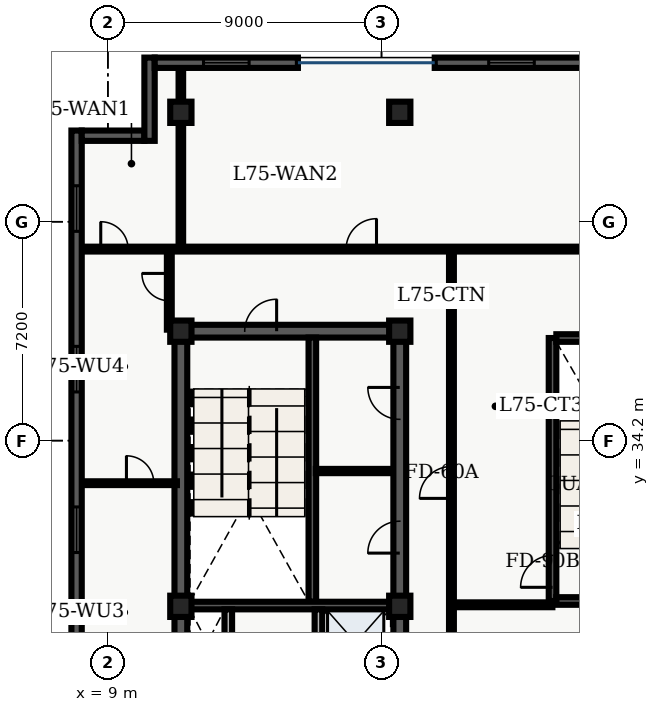
"""IFC4 building model, lengths in metres.
Left out: names, types, materials, properties, quantities, classifications, styles, units other than length and angle.
Written with IfcOpenShell. Run it as: python <this file> out.ifc"""

import sys

from ifc_helpers import new_model, entity, si_unit, converted_unit, direction, frame, origin_with_axes, origin_2d_with_axis, place, context, subcontext, project, spatial, polyline, rectangle, outline, extrude, element, fill, save


model = new_model("IFC4")
c1 = context("Model", 3, precision=1e-05, world=origin_with_axes(), true_north=direction((0.0, 1.0)))
c2 = subcontext(c1, "Body", "Model", "MODEL_VIEW")
j1 = project(units=[si_unit("LENGTHUNIT", "METRE"), converted_unit("PLANEANGLEUNIT", "DEGREE", entity("IfcPlaneAngleMeasure", 0.017), si_unit("PLANEANGLEUNIT", "RADIAN"), dimensions=[0, 0, 0, 0, 0, 0, 0])], contexts=[c1])
p1 = place(None, origin_with_axes())
s1 = spatial("IfcSite", under=j1, at=p1, CompositionType="ELEMENT")
p2 = place(p1, origin_with_axes())
s2 = spatial("IfcBuilding", under=s1, at=p2, CompositionType="ELEMENT")
p3 = place(p2, frame((0.0, 0.0, 303.6), z_axis=(0.0, 0.0, 1.0), x_axis=(1.0, 0.0, 0.0)))
s3 = spatial("IfcBuildingStorey", under=s2, at=p3, CompositionType="ELEMENT", Elevation=303.6)
p4 = place(p3, frame((11.4, 10.8, 0.0), z_axis=(0.0, 0.0, 1.0), x_axis=(0.0, 1.0, 0.0)))
e1 = element("IfcWall", 1, at=p4, inside=s3, PredefinedType="SHEAR", context=c2, shape_type="SweptSolid", body=[
    extrude(outline(polyline([(0.0, -0.21), (27.0, -0.21), (27.0, 0.21), (0.0, 0.21), (0.0, -0.21)])), origin_with_axes(), (0.0, 0.0, 1.0), 4.84),
])
p5 = place(p3, frame((11.4, 37.8, 0.0), z_axis=(0.0, 0.0, 1.0), x_axis=(1.0, 0.0, 0.0)))
e2 = element("IfcWall", 2, at=p5, inside=s3, PredefinedType="SHEAR", context=c2, shape_type="SweptSolid", body=[
    extrude(outline(polyline([(0.0, -0.21), (7.2, -0.21), (7.2, 0.21), (0.0, 0.21), (0.0, -0.21)])), origin_with_axes(), (0.0, 0.0, 1.0), 4.84),
])
p6 = place(p5, frame((2.625, 0.0, 0.0), z_axis=(0.0, 0.0, 1.0), x_axis=(1.0, 0.0, 0.0)))
e3 = element("IfcOpeningElement", 3, at=p6, cuts=e2, PredefinedType="OPENING", context=c2, shape_type="SweptSolid", body=[
    extrude(rectangle(XDim=1.05, YDim=0.44, at=origin_2d_with_axis()), origin_with_axes(), (0.0, 0.0, 1.0), 2.15),
])
p7 = place(p3, frame((18.6, 24.3, 0.0), z_axis=(0.0, 0.0, 1.0), x_axis=(0.0, 1.0, 0.0)))
e4 = element("IfcWall", 4, at=p7, inside=s3, PredefinedType="SHEAR", context=c2, shape_type="SweptSolid", body=[
    extrude(outline(polyline([(0.0, -0.21), (13.5, -0.21), (13.5, 0.21), (0.0, 0.21), (0.0, -0.21)])), origin_with_axes(), (0.0, 0.0, 1.0), 4.84),
])
p8 = place(p7, frame((2.9, 0.0, 0.0), z_axis=(0.0, 0.0, 1.0), x_axis=(1.0, 0.0, 0.0)))
e5 = element("IfcOpeningElement", 5, at=p8, cuts=e4, PredefinedType="OPENING", context=c2, shape_type="SweptSolid", body=[
    extrude(rectangle(XDim=1.1, YDim=0.44, at=origin_2d_with_axis()), origin_with_axes(), (0.0, 0.0, 1.0), 2.15),
])
p9 = place(p7, frame((6.725, 0.0, 0.0), z_axis=(0.0, 0.0, 1.0), x_axis=(1.0, 0.0, 0.0)))
e6 = element("IfcOpeningElement", 6, at=p9, cuts=e4, PredefinedType="OPENING", context=c2, shape_type="SweptSolid", body=[
    extrude(rectangle(XDim=1.05, YDim=0.44, at=origin_2d_with_axis()), origin_with_axes(), (0.0, 0.0, 1.0), 2.15),
])
p10 = place(p7, frame((11.125, 0.0, 0.0), z_axis=(0.0, 0.0, 1.0), x_axis=(1.0, 0.0, 0.0)))
e7 = element("IfcOpeningElement", 7, at=p10, cuts=e4, PredefinedType="OPENING", context=c2, shape_type="SweptSolid", body=[
    extrude(rectangle(XDim=1.05, YDim=0.44, at=origin_2d_with_axis()), origin_with_axes(), (0.0, 0.0, 1.0), 2.15),
])
p11 = place(p3, frame((15.725, 28.9, 0.0), z_axis=(0.0, 0.0, 1.0), x_axis=(0.0, 1.0, 0.0)))
e8 = element("IfcWall", 8, at=p11, inside=s3, PredefinedType="SHEAR", context=c2, shape_type="SweptSolid", body=[
    extrude(outline(polyline([(0.0, -0.125), (8.69, -0.125), (8.69, 0.125), (0.0, 0.125), (0.0, -0.125)])), origin_with_axes(), (0.0, 0.0, 1.0), 4.84),
])
p12 = place(p3, frame((11.61, 28.775, 0.0), z_axis=(0.0, 0.0, 1.0), x_axis=(1.0, 0.0, 0.0)))
e9 = element("IfcWall", 9, at=p12, inside=s3, PredefinedType="SHEAR", context=c2, shape_type="SweptSolid", body=[
    extrude(outline(polyline([(0.0, -0.125), (6.78, -0.125), (6.78, 0.125), (0.0, 0.125), (0.0, -0.125)])), origin_with_axes(), (0.0, 0.0, 1.0), 4.84),
])
for number, where, z_axis, x_axis in (
    (10, (12.96, 26.45, 0.0), (0.0, 0.0, 1.0), (0.0, 1.0, 0.0)),
    (11, (15.925, 26.45, 0.0), (0.0, 0.0, 1.0), (0.0, 1.0, 0.0)),
):
    element("IfcWall", number, at=place(p3, frame(where, z_axis=z_axis, x_axis=x_axis)), inside=s3, PredefinedType="SOLIDWALL", context=c2, shape_type="SweptSolid", body=[
        extrude(outline(polyline([(0.0, -0.125), (2.2, -0.125), (2.2, 0.125), (0.0, 0.125), (0.0, -0.125)])), origin_with_axes(), (0.0, 0.0, 1.0), 3.6),
    ])
p13 = place(p3, frame((23.625, 28.925, 0.0), z_axis=(0.0, 0.0, 1.0), x_axis=(0.0, 1.0, 0.0)))
e12 = element("IfcWall", 12, at=p13, inside=s3, PredefinedType="SHEAR", context=c2, shape_type="SweptSolid", body=[
    extrude(outline(polyline([(0.0, -0.125), (8.65, -0.125), (8.65, 0.125), (0.0, 0.125), (0.0, -0.125)])), origin_with_axes(), (0.0, 0.0, 1.0), 4.84),
])
p14 = place(p13, frame((0.975, 0.0, 0.0), z_axis=(0.0, 0.0, 1.0), x_axis=(1.0, 0.0, 0.0)))
e13 = element("IfcOpeningElement", 13, at=p14, cuts=e12, PredefinedType="OPENING", context=c2, shape_type="SweptSolid", body=[
    extrude(rectangle(XDim=1.05, YDim=0.27, at=origin_2d_with_axis()), origin_with_axes(), (0.0, 0.0, 1.0), 2.15),
])
for number, where, z_axis, x_axis in (
    (14, (23.75, 28.925, 0.0), (0.0, 0.0, 1.0), (1.0, 0.0, 0.0)),
    (15, (23.75, 37.575, 0.0), (0.0, 0.0, 1.0), (1.0, 0.0, 0.0)),
):
    element("IfcWall", number, at=place(p3, frame(where, z_axis=z_axis, x_axis=x_axis)), inside=s3, PredefinedType="SHEAR", context=c2, shape_type="SweptSolid", body=[
        extrude(outline(polyline([(0.0, -0.125), (3.9, -0.125), (3.9, 0.125), (0.0, 0.125), (0.0, -0.125)])), origin_with_axes(), (0.0, 0.0, 1.0), 4.84),
    ])
for number, where, z_axis, x_axis in (
    (16, (11.4, 28.75, 0.0), (0.0, 0.0, 1.0), (1.0, 0.0, 0.0)),
    (17, (11.4, 37.8, 0.0), (0.0, 0.0, 1.0), (1.0, 0.0, 0.0)),
    (18, (11.4, 45.0, 0.0), (0.0, 0.0, 1.0), (1.0, 0.0, 0.0)),
    (19, (18.6, 28.75, 0.0), (0.0, 0.0, 1.0), (1.0, 0.0, 0.0)),
    (20, (18.6, 37.8, 0.0), (0.0, 0.0, 1.0), (1.0, 0.0, 0.0)),
    (21, (18.6, 45.0, 0.0), (0.0, 0.0, 1.0), (1.0, 0.0, 0.0)),
):
    element("IfcColumn", number, at=place(p3, frame(where, z_axis=z_axis, x_axis=x_axis)), inside=s3, PredefinedType="COLUMN", context=c2, shape_type="SweptSolid", body=[
        extrude(rectangle(XDim=0.7, YDim=0.7, at=origin_2d_with_axis()), origin_with_axes(), (0.0, 0.0, 1.0), 5.1),
    ])
p15 = place(p3, frame((15.84, 33.2, 0.0), z_axis=(0.0, 0.0, 1.0), x_axis=(1.0, 0.0, 0.0)))
e22 = element("IfcWall", 22, at=p15, inside=s3, PredefinedType="PARTITIONING", context=c2, shape_type="SweptSolid", body=[
    extrude(outline(polyline([(0.0, -0.07), (2.46, -0.07), (2.46, 0.07), (0.0, 0.07), (0.0, -0.07)])), origin_with_axes(), (0.0, 0.0, 1.0), 3.2),
])
p16 = place(p3, frame((8.135, 40.5, 0.0), z_axis=(0.0, 0.0, 1.0), x_axis=(1.0, 0.0, 0.0)))
e23 = element("IfcWall", 23, at=p16, inside=s3, PredefinedType="PARTITIONING", context=c2, shape_type="SweptSolid", body=[
    extrude(outline(polyline([(0.0, -0.08), (22.715, -0.08), (22.715, 0.08), (0.0, 0.08), (0.0, -0.08)])), origin_with_axes(), (0.0, 0.0, 1.0), 3.2),
])
p17 = place(p16, frame((1.08, 0.0, 0.0), z_axis=(0.0, 0.0, 1.0), x_axis=(1.0, 0.0, 0.0)))
e24 = element("IfcOpeningElement", 24, at=p17, cuts=e23, PredefinedType="OPENING", context=c2, shape_type="SweptSolid", body=[
    extrude(rectangle(XDim=0.9, YDim=0.18, at=origin_2d_with_axis()), origin_with_axes(), (0.0, 0.0, 1.0), 2.15),
])
p18 = place(p16, frame((9.2, 0.0, 0.0), z_axis=(0.0, 0.0, 1.0), x_axis=(1.0, 0.0, 0.0)))
e25 = element("IfcOpeningElement", 25, at=p18, cuts=e23, PredefinedType="OPENING", context=c2, shape_type="SweptSolid", body=[
    extrude(rectangle(XDim=1.0, YDim=0.18, at=origin_2d_with_axis()), origin_with_axes(), (0.0, 0.0, 1.0), 2.15),
])
p19 = place(p3, frame((20.3, 2.14, 0.0), z_axis=(0.0, 0.0, 1.0), x_axis=(0.0, 1.0, 0.0)))
e26 = element("IfcWall", 26, at=p19, inside=s3, PredefinedType="PARTITIONING", context=c2, shape_type="SweptSolid", body=[
    extrude(outline(polyline([(0.0, -0.08), (38.36, -0.08), (38.36, 0.08), (0.0, 0.08), (0.0, -0.08)])), origin_with_axes(), (0.0, 0.0, 1.0), 3.2),
])
p20 = place(p19, frame((30.685, 0.0, 0.0), z_axis=(0.0, 0.0, 1.0), x_axis=(1.0, 0.0, 0.0)))
e27 = element("IfcOpeningElement", 27, at=p20, cuts=e26, PredefinedType="OPENING", context=c2, shape_type="SweptSolid", body=[
    extrude(rectangle(XDim=1.05, YDim=0.18, at=origin_2d_with_axis()), origin_with_axes(), (0.0, 0.0, 1.0), 2.15),
])
p21 = place(p19, frame((13.275, 0.0, 0.0), z_axis=(0.0, 0.0, 1.0), x_axis=(1.0, 0.0, 0.0)))
e28 = element("IfcOpeningElement", 28, at=p21, cuts=e26, PredefinedType="OPENING", context=c2, shape_type="SweptSolid", body=[
    extrude(rectangle(XDim=1.0, YDim=0.18, at=origin_2d_with_axis()), origin_with_axes(), (0.0, 0.0, 1.0), 2.15),
])
p22 = place(p3, frame((20.3, 28.8, 0.0), z_axis=(0.0, 0.0, 1.0), x_axis=(1.0, 0.0, 0.0)))
e29 = element("IfcWall", 29, at=p22, inside=s3, PredefinedType="PARTITIONING", context=c2, shape_type="SweptSolid", body=[
    extrude(outline(polyline([(0.0, -0.08), (3.32, -0.08), (3.32, 0.08), (0.0, 0.08), (0.0, -0.08)])), origin_with_axes(), (0.0, 0.0, 1.0), 3.2),
])
p23 = place(p3, frame((11.02, 37.85, 0.0), z_axis=(0.0, 0.0, 1.0), x_axis=(0.0, 1.0, 0.0)))
e30 = element("IfcWall", 30, at=p23, inside=s3, PredefinedType="PARTITIONING", context=c2, shape_type="SweptSolid", body=[
    extrude(outline(polyline([(0.0, -0.08), (2.65, -0.08), (2.65, 0.08), (0.0, 0.08), (0.0, -0.08)])), origin_with_axes(), (0.0, 0.0, 1.0), 3.2),
])
p24 = place(p23, frame((1.4, 0.0, 0.0), z_axis=(0.0, 0.0, 1.0), x_axis=(1.0, 0.0, 0.0)))
e31 = element("IfcOpeningElement", 31, at=p24, cuts=e30, PredefinedType="OPENING", context=c2, shape_type="SweptSolid", body=[
    extrude(rectangle(XDim=0.9, YDim=0.18, at=origin_2d_with_axis()), origin_with_axes(), (0.0, 0.0, 1.0), 2.15),
])
p25 = place(p3, frame((8.135, 32.8, 0.0), z_axis=(0.0, 0.0, 1.0), x_axis=(1.0, 0.0, 0.0)))
e32 = element("IfcWall", 32, at=p25, inside=s3, PredefinedType="PARTITIONING", context=c2, shape_type="SweptSolid", body=[
    extrude(outline(polyline([(0.0, -0.062), (3.135, -0.062), (3.135, 0.062), (0.0, 0.062), (0.0, -0.062)])), origin_with_axes(), (0.0, 0.0, 1.0), 3.2),
])
p26 = place(p25, frame((1.925, 0.0, 0.0), z_axis=(0.0, 0.0, 1.0), x_axis=(1.0, 0.0, 0.0)))
e33 = element("IfcOpeningElement", 33, at=p26, cuts=e32, PredefinedType="OPENING", context=c2, shape_type="SweptSolid", body=[
    extrude(rectangle(XDim=0.9, YDim=0.145, at=origin_2d_with_axis()), origin_with_axes(), (0.0, 0.0, 1.0), 2.15),
])
p27 = place(p3, frame((11.4, 40.6, 0.0), z_axis=(0.0, 0.0, 1.0), x_axis=(0.0, 1.0, 0.0)))
e34 = element("IfcWall", 34, at=p27, inside=s3, PredefinedType="PARTITIONING", context=c2, shape_type="SweptSolid", body=[
    extrude(outline(polyline([(0.0, -0.075), (5.865, -0.075), (5.865, 0.075), (0.0, 0.075), (0.0, -0.075)])), origin_with_axes(), (0.0, 0.0, 1.0), 3.2),
])
p28 = place(p3, frame((7.97, 4.54, 0.0), z_axis=(0.0, 0.0, 1.0), x_axis=(0.0, 1.0, 0.0)))
e35 = element("IfcWall", 35, at=p28, inside=s3, PredefinedType="SOLIDWALL", context=c2, shape_type="SweptSolid", body=[
    extrude(outline(polyline([(0.0, -0.17), (39.86, -0.17), (39.86, 0.17), (0.0, 0.17), (0.0, -0.17)])), origin_with_axes(), (0.0, 0.0, 1.0), 4.84),
])
p29 = place(p28, frame((7.849, 0.0, 0.45), z_axis=(0.0, 0.0, 1.0), x_axis=(1.0, 0.0, 0.0)))
e36 = element("IfcOpeningElement", 36, at=p29, cuts=e35, PredefinedType="OPENING", context=c2, shape_type="SweptSolid", body=[
    extrude(rectangle(XDim=1.5, YDim=0.36, at=origin_2d_with_axis()), origin_with_axes(), (0.0, 0.0, 1.0), 2.1),
])
p30 = place(p28, frame((12.681, 0.0, 0.45), z_axis=(0.0, 0.0, 1.0), x_axis=(1.0, 0.0, 0.0)))
e37 = element("IfcOpeningElement", 37, at=p30, cuts=e35, PredefinedType="OPENING", context=c2, shape_type="SweptSolid", body=[
    extrude(rectangle(XDim=1.5, YDim=0.36, at=origin_2d_with_axis()), origin_with_axes(), (0.0, 0.0, 1.0), 2.1),
])
p31 = place(p28, frame((17.514, 0.0, 0.45), z_axis=(0.0, 0.0, 1.0), x_axis=(1.0, 0.0, 0.0)))
e38 = element("IfcOpeningElement", 38, at=p31, cuts=e35, PredefinedType="OPENING", context=c2, shape_type="SweptSolid", body=[
    extrude(rectangle(XDim=1.5, YDim=0.36, at=origin_2d_with_axis()), origin_with_axes(), (0.0, 0.0, 1.0), 2.1),
])
p32 = place(p28, frame((22.346, 0.0, 0.45), z_axis=(0.0, 0.0, 1.0), x_axis=(1.0, 0.0, 0.0)))
e39 = element("IfcOpeningElement", 39, at=p32, cuts=e35, PredefinedType="OPENING", context=c2, shape_type="SweptSolid", body=[
    extrude(rectangle(XDim=1.5, YDim=0.36, at=origin_2d_with_axis()), origin_with_axes(), (0.0, 0.0, 1.0), 2.1),
])
p33 = place(p28, frame((26.729, 0.0, 0.45), z_axis=(0.0, 0.0, 1.0), x_axis=(1.0, 0.0, 0.0)))
e40 = element("IfcOpeningElement", 40, at=p33, cuts=e35, PredefinedType="OPENING", context=c2, shape_type="SweptSolid", body=[
    extrude(rectangle(XDim=1.5, YDim=0.36, at=origin_2d_with_axis()), origin_with_axes(), (0.0, 0.0, 1.0), 2.1),
])
p34 = place(p28, frame((32.011, 0.0, 0.45), z_axis=(0.0, 0.0, 1.0), x_axis=(1.0, 0.0, 0.0)))
e41 = element("IfcOpeningElement", 41, at=p34, cuts=e35, PredefinedType="OPENING", context=c2, shape_type="SweptSolid", body=[
    extrude(rectangle(XDim=1.5, YDim=0.36, at=origin_2d_with_axis()), origin_with_axes(), (0.0, 0.0, 1.0), 2.1),
])
p35 = place(p28, frame((37.294, 0.0, 0.45), z_axis=(0.0, 0.0, 1.0), x_axis=(1.0, 0.0, 0.0)))
e42 = element("IfcOpeningElement", 42, at=p35, cuts=e35, PredefinedType="OPENING", context=c2, shape_type="SweptSolid", body=[
    extrude(rectangle(XDim=1.5, YDim=0.36, at=origin_2d_with_axis()), origin_with_axes(), (0.0, 0.0, 1.0), 2.1),
])
p36 = place(p3, frame((8.14, 44.23, 0.0), z_axis=(0.0, 0.0, 1.0), x_axis=(1.0, 0.0, 0.0)))
e43 = element("IfcWall", 43, at=p36, inside=s3, PredefinedType="SOLIDWALL", context=c2, shape_type="SweptSolid", body=[
    extrude(outline(polyline([(0.0, -0.17), (2.06, -0.17), (2.06, 0.17), (0.0, 0.17), (0.0, -0.17)])), origin_with_axes(), (0.0, 0.0, 1.0), 4.84),
])
p37 = place(p3, frame((10.37, 44.06, 0.0), z_axis=(0.0, 0.0, 1.0), x_axis=(0.0, 1.0, 0.0)))
e44 = element("IfcWall", 44, at=p37, inside=s3, PredefinedType="SOLIDWALL", context=c2, shape_type="SweptSolid", body=[
    extrude(outline(polyline([(0.0, -0.17), (2.74, -0.17), (2.74, 0.17), (0.0, 0.17), (0.0, -0.17)])), origin_with_axes(), (0.0, 0.0, 1.0), 4.84),
])
p38 = place(p3, frame((10.54, 46.63, 0.0), z_axis=(0.0, 0.0, 1.0), x_axis=(1.0, 0.0, 0.0)))
e45 = element("IfcWall", 45, at=p38, inside=s3, PredefinedType="SOLIDWALL", context=c2, shape_type="SweptSolid", body=[
    extrude(outline(polyline([(0.0, -0.17), (4.71, -0.17), (4.71, 0.17), (0.0, 0.17), (0.0, -0.17)])), origin_with_axes(), (0.0, 0.0, 1.0), 4.84),
])
p39 = place(p38, frame((2.355, 0.0, 0.45), z_axis=(0.0, 0.0, 1.0), x_axis=(1.0, 0.0, 0.0)))
e46 = element("IfcOpeningElement", 46, at=p39, cuts=e45, PredefinedType="OPENING", context=c2, shape_type="SweptSolid", body=[
    extrude(rectangle(XDim=1.5, YDim=0.36, at=origin_2d_with_axis()), origin_with_axes(), (0.0, 0.0, 1.0), 2.1),
])
p40 = place(p3, frame((19.75, 46.63, 0.0), z_axis=(0.0, 0.0, 1.0), x_axis=(1.0, 0.0, 0.0)))
e47 = element("IfcWall", 47, at=p40, inside=s3, PredefinedType="SOLIDWALL", context=c2, shape_type="SweptSolid", body=[
    extrude(outline(polyline([(0.0, -0.17), (5.05, -0.17), (5.05, 0.17), (0.0, 0.17), (0.0, -0.17)])), origin_with_axes(), (0.0, 0.0, 1.0), 4.84),
])
p41 = place(p40, frame((2.525, 0.0, 0.45), z_axis=(0.0, 0.0, 1.0), x_axis=(1.0, 0.0, 0.0)))
e48 = element("IfcOpeningElement", 48, at=p41, cuts=e47, PredefinedType="OPENING", context=c2, shape_type="SweptSolid", body=[
    extrude(rectangle(XDim=1.5, YDim=0.36, at=origin_2d_with_axis()), origin_with_axes(), (0.0, 0.0, 1.0), 2.1),
])
p42 = place(p5, frame((2.625, 0.0, 0.0), z_axis=(0.0, 0.0, 1.0), x_axis=(1.0, 0.0, 0.0)))
e49 = element("IfcDoor", 49, at=p42, inside=s3, OperationType="SINGLE_SWING_RIGHT", PredefinedType="DOOR", context=c2, shape_type="SweptSolid", body=[
    extrude(rectangle(XDim=1.05, YDim=0.09, at=origin_2d_with_axis()), origin_with_axes(), (0.0, 0.0, 1.0), 2.15),
])
fill(e3, e49)
p43 = place(p7, frame((6.725, 0.0, 0.0), z_axis=(0.0, 0.0, 1.0), x_axis=(1.0, 0.0, 0.0)))
e50 = element("IfcDoor", 50, at=p43, inside=s3, OperationType="SINGLE_SWING_LEFT", PredefinedType="DOOR", context=c2, shape_type="SweptSolid", body=[
    extrude(rectangle(XDim=1.05, YDim=0.09, at=origin_2d_with_axis()), origin_with_axes(), (0.0, 0.0, 1.0), 2.15),
])
fill(e6, e50)
p44 = place(p7, frame((11.125, 0.0, 0.0), z_axis=(0.0, 0.0, 1.0), x_axis=(1.0, 0.0, 0.0)))
e51 = element("IfcDoor", 51, at=p44, inside=s3, OperationType="SINGLE_SWING_RIGHT", PredefinedType="DOOR", context=c2, shape_type="SweptSolid", body=[
    extrude(rectangle(XDim=1.05, YDim=0.09, at=origin_2d_with_axis()), origin_with_axes(), (0.0, 0.0, 1.0), 2.15),
])
fill(e7, e51)
p45 = place(p13, frame((0.975, 0.0, 0.0), z_axis=(0.0, 0.0, 1.0), x_axis=(1.0, 0.0, 0.0)))
e52 = element("IfcDoor", 52, at=p45, inside=s3, OperationType="SINGLE_SWING_LEFT", PredefinedType="DOOR", context=c2, shape_type="SweptSolid", body=[
    extrude(rectangle(XDim=1.05, YDim=0.09, at=origin_2d_with_axis()), origin_with_axes(), (0.0, 0.0, 1.0), 2.15),
])
fill(e13, e52)
p46 = place(p19, frame((30.685, 0.0, 0.0), z_axis=(0.0, 0.0, 1.0), x_axis=(1.0, 0.0, 0.0)))
e53 = element("IfcDoor", 53, at=p46, inside=s3, OperationType="SINGLE_SWING_LEFT", PredefinedType="DOOR", context=c2, shape_type="SweptSolid", body=[
    extrude(rectangle(XDim=1.05, YDim=0.09, at=origin_2d_with_axis()), origin_with_axes(), (0.0, 0.0, 1.0), 2.15),
])
fill(e27, e53)
p47 = place(p25, frame((1.925, 0.0, 0.0), z_axis=(0.0, 0.0, 1.0), x_axis=(1.0, 0.0, 0.0)))
e54 = element("IfcDoor", 54, at=p47, inside=s3, OperationType="SINGLE_SWING_LEFT", PredefinedType="DOOR", context=c2, shape_type="SweptSolid", body=[
    extrude(rectangle(XDim=0.9, YDim=0.075, at=origin_2d_with_axis()), origin_with_axes(), (0.0, 0.0, 1.0), 2.15),
])
fill(e33, e54)
p48 = place(p23, frame((1.4, 0.0, 0.0), z_axis=(0.0, 0.0, 1.0), x_axis=(1.0, 0.0, 0.0)))
e55 = element("IfcDoor", 55, at=p48, inside=s3, OperationType="SINGLE_SWING_RIGHT", PredefinedType="DOOR", context=c2, shape_type="SweptSolid", body=[
    extrude(rectangle(XDim=0.9, YDim=0.09, at=origin_2d_with_axis()), origin_with_axes(), (0.0, 0.0, 1.0), 2.15),
])
fill(e31, e55)
p49 = place(p16, frame((1.08, 0.0, 0.0), z_axis=(0.0, 0.0, 1.0), x_axis=(1.0, 0.0, 0.0)))
e56 = element("IfcDoor", 56, at=p49, inside=s3, OperationType="SINGLE_SWING_LEFT", PredefinedType="DOOR", context=c2, shape_type="SweptSolid", body=[
    extrude(rectangle(XDim=0.9, YDim=0.09, at=origin_2d_with_axis()), origin_with_axes(), (0.0, 0.0, 1.0), 2.15),
])
fill(e24, e56)
p50 = place(p16, frame((9.2, 0.0, 0.0), z_axis=(0.0, 0.0, 1.0), x_axis=(1.0, 0.0, 0.0)))
e57 = element("IfcDoor", 57, at=p50, inside=s3, OperationType="SINGLE_SWING_RIGHT", PredefinedType="DOOR", context=c2, shape_type="SweptSolid", body=[
    extrude(rectangle(XDim=1.0, YDim=0.09, at=origin_2d_with_axis()), origin_with_axes(), (0.0, 0.0, 1.0), 2.15),
])
fill(e25, e57)
p51 = place(p28, frame((26.729, 0.0, 0.45), z_axis=(0.0, 0.0, 1.0), x_axis=(1.0, 0.0, 0.0)))
e58 = element("IfcWindow", 58, at=p51, inside=s3, PredefinedType="WINDOW", context=c2, shape_type="SweptSolid", body=[
    extrude(rectangle(XDim=1.5, YDim=0.09, at=origin_2d_with_axis()), origin_with_axes(), (0.0, 0.0, 1.0), 2.1),
])
fill(e40, e58)
p52 = place(p28, frame((32.011, 0.0, 0.45), z_axis=(0.0, 0.0, 1.0), x_axis=(1.0, 0.0, 0.0)))
e59 = element("IfcWindow", 59, at=p52, inside=s3, PredefinedType="WINDOW", context=c2, shape_type="SweptSolid", body=[
    extrude(rectangle(XDim=1.5, YDim=0.09, at=origin_2d_with_axis()), origin_with_axes(), (0.0, 0.0, 1.0), 2.1),
])
fill(e41, e59)
p53 = place(p28, frame((37.294, 0.0, 0.45), z_axis=(0.0, 0.0, 1.0), x_axis=(1.0, 0.0, 0.0)))
e60 = element("IfcWindow", 60, at=p53, inside=s3, PredefinedType="WINDOW", context=c2, shape_type="SweptSolid", body=[
    extrude(rectangle(XDim=1.5, YDim=0.09, at=origin_2d_with_axis()), origin_with_axes(), (0.0, 0.0, 1.0), 2.1),
])
fill(e42, e60)
p54 = place(p38, frame((2.355, 0.0, 0.45), z_axis=(0.0, 0.0, 1.0), x_axis=(1.0, 0.0, 0.0)))
e61 = element("IfcWindow", 61, at=p54, inside=s3, PredefinedType="WINDOW", context=c2, shape_type="SweptSolid", body=[
    extrude(rectangle(XDim=1.5, YDim=0.09, at=origin_2d_with_axis()), origin_with_axes(), (0.0, 0.0, 1.0), 2.1),
])
fill(e46, e61)
p55 = place(p40, frame((2.525, 0.0, 0.45), z_axis=(0.0, 0.0, 1.0), x_axis=(1.0, 0.0, 0.0)))
e62 = element("IfcWindow", 62, at=p55, inside=s3, PredefinedType="WINDOW", context=c2, shape_type="SweptSolid", body=[
    extrude(rectangle(XDim=1.5, YDim=0.09, at=origin_2d_with_axis()), origin_with_axes(), (0.0, 0.0, 1.0), 2.1),
])
fill(e48, e62)
save(model, sys.argv[1])
